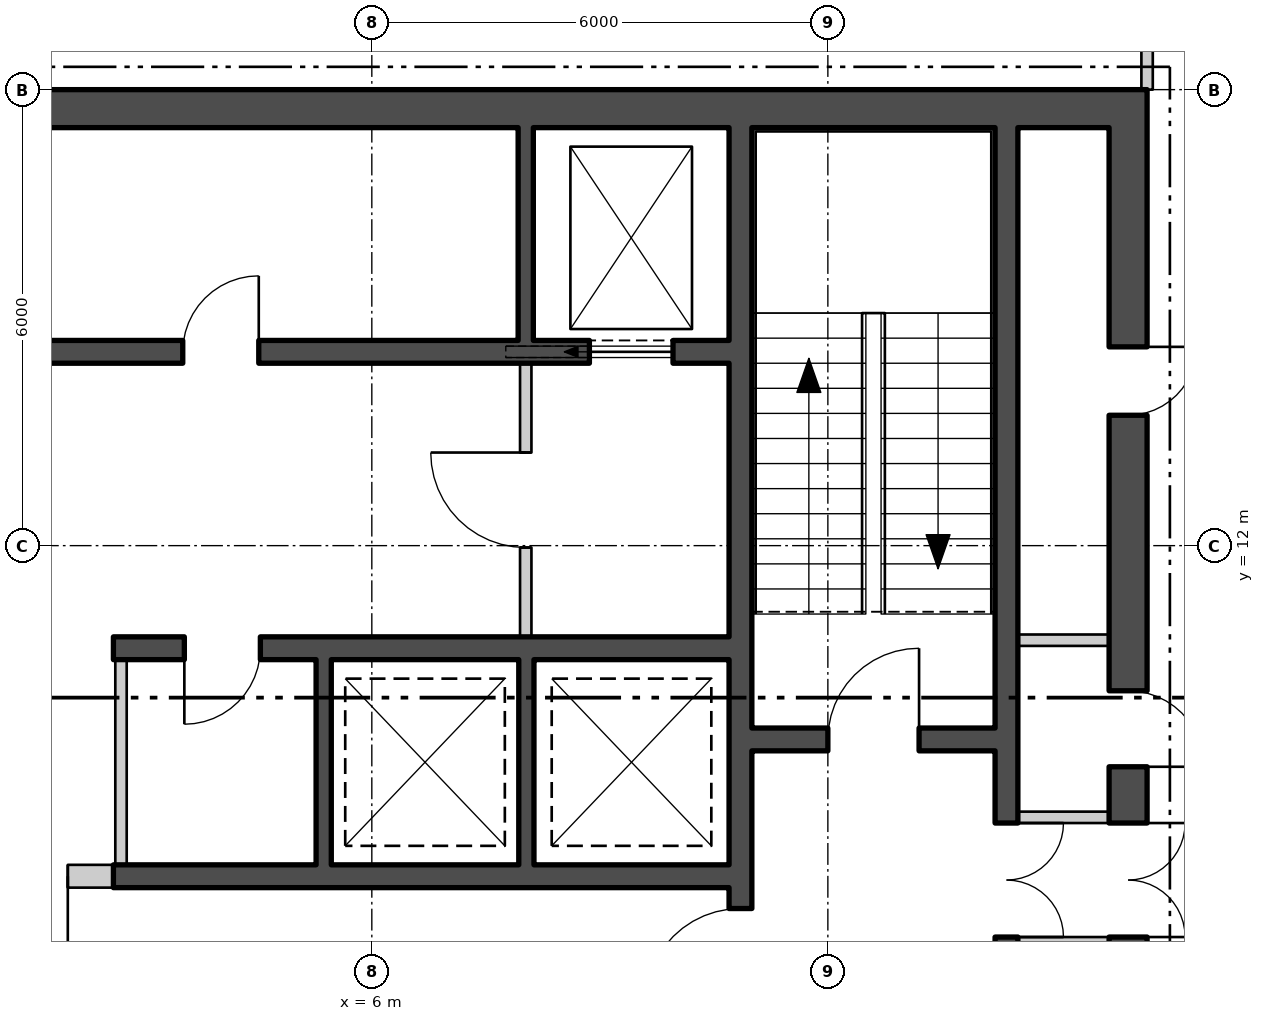
"""IFC4 building model, lengths in metres.
Left out: names, types, materials, properties, quantities, classifications, styles, units other than length and angle.
Written with IfcOpenShell. Run it as: python <this file> out.ifc"""

import sys

from ifc_helpers import new_model, si_unit, direction, frame, frame_2d, origin, place, context, subcontext, project, spatial, polyline, rectangle, outline, extrude, element, fill, save


model = new_model("IFC4")
c1 = context("Model", 3, precision=1e-05, world=origin(), true_north=direction((0.0, 1.0)))
c2 = subcontext(c1, "Body", "Model", "MODEL_VIEW")
j1 = project(units=[si_unit("LENGTHUNIT", "METRE"), si_unit("PLANEANGLEUNIT", "RADIAN")], contexts=[c1])
p1 = place(None, origin())
s1 = spatial("IfcSite", under=j1, at=p1, CompositionType="ELEMENT")
p2 = place(p1, origin())
s2 = spatial("IfcBuilding", under=s1, at=p2, CompositionType="ELEMENT")
p3 = place(p2, frame((0.0, 0.0, 151.5)))
s3 = spatial("IfcBuildingStorey", under=s2, at=p3, CompositionType="ELEMENT", Elevation=151.5)
p4 = place(p3, frame((4.21, -26.921, -0.18), z_axis=(0.0, 0.0, 1.0), x_axis=(0.500000141277, 0.866025322218, 0.0)))
e1 = element("IfcWall", 1, at=p4, inside=s3, PredefinedType="SOLIDWALL", context=c2, shape_type="SweptSolid", body=[
    extrude(outline(polyline([(-0.13, -0.225), (45.86, -0.225), (45.6, 0.225), (0.13, 0.225), (-0.13, -0.225)])), origin(), (0.0, 0.0, 1.0), 3.68),
])
p5 = place(p4, frame((1.424, 0.0, 1.08)))
e2 = element("IfcOpeningElement", 2, at=p5, cuts=e1, PredefinedType="OPENING", context=c2, shape_type="SweptSolid", body=[
    extrude(rectangle(XDim=2.4, YDim=2.0, at=frame_2d((1.2, 1.0))), frame((0.0, 0.235, 0.0), z_axis=(0.0, -1.0, 0.0), x_axis=(1.0, 0.0, 0.0)), (0.0, 0.0, 1.0), 0.47),
])
p6 = place(p4, frame((5.892, 0.0, 1.08)))
e3 = element("IfcOpeningElement", 3, at=p6, cuts=e1, PredefinedType="OPENING", context=c2, shape_type="SweptSolid", body=[
    extrude(rectangle(XDim=2.4, YDim=2.0, at=frame_2d((1.2, 1.0))), frame((0.0, 0.235, 0.0), z_axis=(0.0, -1.0, 0.0), x_axis=(1.0, 0.0, 0.0)), (0.0, 0.0, 1.0), 0.47),
])
p7 = place(p4, frame((10.399, 0.0, 1.08)))
e4 = element("IfcOpeningElement", 4, at=p7, cuts=e1, PredefinedType="OPENING", context=c2, shape_type="SweptSolid", body=[
    extrude(rectangle(XDim=2.4, YDim=2.0, at=frame_2d((1.2, 1.0))), frame((0.0, 0.235, 0.0), z_axis=(0.0, -1.0, 0.0), x_axis=(1.0, 0.0, 0.0)), (0.0, 0.0, 1.0), 0.47),
])
p8 = place(p4, frame((14.905, 0.0, 1.08)))
e5 = element("IfcOpeningElement", 5, at=p8, cuts=e1, PredefinedType="OPENING", context=c2, shape_type="SweptSolid", body=[
    extrude(rectangle(XDim=2.4, YDim=2.0, at=frame_2d((1.2, 1.0))), frame((0.0, 0.235, 0.0), z_axis=(0.0, -1.0, 0.0), x_axis=(1.0, 0.0, 0.0)), (0.0, 0.0, 1.0), 0.47),
])
p9 = place(p4, frame((19.412, 0.0, 1.08)))
e6 = element("IfcOpeningElement", 6, at=p9, cuts=e1, PredefinedType="OPENING", context=c2, shape_type="SweptSolid", body=[
    extrude(rectangle(XDim=2.4, YDim=2.0, at=frame_2d((1.2, 1.0))), frame((0.0, 0.235, 0.0), z_axis=(0.0, -1.0, 0.0), x_axis=(1.0, 0.0, 0.0)), (0.0, 0.0, 1.0), 0.47),
])
p10 = place(p4, frame((23.918, 0.0, 1.08)))
e7 = element("IfcOpeningElement", 7, at=p10, cuts=e1, PredefinedType="OPENING", context=c2, shape_type="SweptSolid", body=[
    extrude(rectangle(XDim=2.4, YDim=2.0, at=frame_2d((1.2, 1.0))), frame((0.0, 0.235, 0.0), z_axis=(0.0, -1.0, 0.0), x_axis=(1.0, 0.0, 0.0)), (0.0, 0.0, 1.0), 0.47),
])
p11 = place(p4, frame((37.438, 0.0, 1.08)))
e8 = element("IfcOpeningElement", 8, at=p11, cuts=e1, PredefinedType="OPENING", context=c2, shape_type="SweptSolid", body=[
    extrude(rectangle(XDim=2.4, YDim=2.0, at=frame_2d((1.2, 1.0))), frame((0.0, 0.235, 0.0), z_axis=(0.0, -1.0, 0.0), x_axis=(1.0, 0.0, 0.0)), (0.0, 0.0, 1.0), 0.47),
])
p12 = place(p4, frame((41.907, 0.0, 1.08)))
e9 = element("IfcOpeningElement", 9, at=p12, cuts=e1, PredefinedType="OPENING", context=c2, shape_type="SweptSolid", body=[
    extrude(rectangle(XDim=2.4, YDim=2.0, at=frame_2d((1.2, 1.0))), frame((0.0, 0.235, 0.0), z_axis=(0.0, -1.0, 0.0), x_axis=(1.0, 0.0, 0.0)), (0.0, 0.0, 1.0), 0.47),
])
p13 = place(p3, frame((-16.2, 17.75, 0.0), z_axis=(0.0, 0.0, 1.0), x_axis=(1.0, 0.0, 0.0)))
e10 = element("IfcWall", 10, at=p13, inside=s3, PredefinedType="SHEAR", context=c2, shape_type="SweptSolid", body=[
    extrude(rectangle(XDim=32.4, YDim=0.5, at=frame_2d((16.2, 0.0))), origin(), (0.0, 0.0, 1.0), 3.7),
])
p14 = place(p3, frame((15.95, 2.5, 0.0), z_axis=(0.0, 0.0, 1.0), x_axis=(0.0, 1.0, 0.0)))
e11 = element("IfcWall", 11, at=p14, inside=s3, PredefinedType="SHEAR", context=c2, shape_type="SweptSolid", body=[
    extrude(rectangle(XDim=15.0, YDim=0.5, at=frame_2d((7.5, 0.0))), origin(), (0.0, 0.0, 1.0), 3.7),
])
p15 = place(p14, frame((4.35, 0.0, 0.0)))
e12 = element("IfcOpeningElement", 12, at=p15, cuts=e11, PredefinedType="OPENING", context=c2, shape_type="SweptSolid", body=[
    extrude(rectangle(XDim=1.5, YDim=2.1, at=frame_2d((0.75, 1.05))), frame((0.0, 0.26, 0.0), z_axis=(0.0, -1.0, 0.0), x_axis=(1.0, 0.0, 0.0)), (0.0, 0.0, 1.0), 0.52),
])
p16 = place(p14, frame((0.825, 0.0, 0.0)))
e13 = element("IfcOpeningElement", 13, at=p16, cuts=e11, PredefinedType="OPENING", context=c2, shape_type="SweptSolid", body=[
    extrude(rectangle(XDim=0.9, YDim=2.1, at=frame_2d((0.45, 1.05))), frame((0.0, 0.26, 0.0), z_axis=(0.0, -1.0, 0.0), x_axis=(1.0, 0.0, 0.0)), (0.0, 0.0, 1.0), 0.52),
])
p17 = place(p14, frame((3.0, 0.0, 0.0)))
e14 = element("IfcOpeningElement", 14, at=p17, cuts=e11, PredefinedType="OPENING", context=c2, shape_type="SweptSolid", body=[
    extrude(rectangle(XDim=0.9, YDim=2.1, at=frame_2d((0.45, 1.05))), frame((0.0, 0.26, 0.0), z_axis=(0.0, -1.0, 0.0), x_axis=(1.0, 0.0, 0.0)), (0.0, 0.0, 1.0), 0.52),
])
p18 = place(p14, frame((6.59, 0.0, 0.0)))
e15 = element("IfcOpeningElement", 15, at=p18, cuts=e11, PredefinedType="OPENING", context=c2, shape_type="SweptSolid", body=[
    extrude(rectangle(XDim=1.0, YDim=2.1, at=frame_2d((0.5, 1.05))), frame((0.0, 0.26, 0.0), z_axis=(0.0, -1.0, 0.0), x_axis=(1.0, 0.0, 0.0)), (0.0, 0.0, 1.0), 0.52),
])
p19 = place(p14, frame((11.215, 0.0, 0.0)))
e16 = element("IfcOpeningElement", 16, at=p19, cuts=e11, PredefinedType="OPENING", context=c2, shape_type="SweptSolid", body=[
    extrude(rectangle(XDim=0.9, YDim=2.1, at=frame_2d((0.45, 1.05))), frame((0.0, 0.26, 0.0), z_axis=(0.0, -1.0, 0.0), x_axis=(1.0, 0.0, 0.0)), (0.0, 0.0, 1.0), 0.52),
])
p20 = place(p3, frame((10.85, 2.5, 0.0), z_axis=(0.0, 0.0, 1.0), x_axis=(0.0, 1.0, 0.0)))
e17 = element("IfcWall", 17, at=p20, inside=s3, PredefinedType="SHEAR", context=c2, shape_type="SweptSolid", body=[
    extrude(rectangle(XDim=15.0, YDim=0.3, at=frame_2d((7.5, 0.0))), origin(), (0.0, 0.0, 1.0), 3.7),
])
p21 = place(p20, frame((3.475, 0.0, 0.0)))
e18 = element("IfcOpeningElement", 18, at=p21, cuts=e17, PredefinedType="OPENING", context=c2, shape_type="SweptSolid", body=[
    extrude(rectangle(XDim=1.25, YDim=2.1, at=frame_2d((0.625, 1.05))), frame((0.0, 0.16, 0.0), z_axis=(0.0, -1.0, 0.0), x_axis=(1.0, 0.0, 0.0)), (0.0, 0.0, 1.0), 0.32),
])
p22 = place(p20, frame((1.125, 0.0, 0.0)))
e19 = element("IfcOpeningElement", 19, at=p22, cuts=e17, PredefinedType="OPENING", context=c2, shape_type="SweptSolid", body=[
    extrude(rectangle(XDim=1.0, YDim=2.1, at=frame_2d((0.5, 1.05))), frame((0.0, 0.16, 0.0), z_axis=(0.0, -1.0, 0.0), x_axis=(1.0, 0.0, 0.0)), (0.0, 0.0, 1.0), 0.32),
])
p23 = place(p3, frame((14.35, 2.5, 0.0), z_axis=(0.0, 0.0, 1.0), x_axis=(0.0, 1.0, 0.0)))
e20 = element("IfcWall", 20, at=p23, inside=s3, PredefinedType="SHEAR", context=c2, shape_type="SweptSolid", body=[
    extrude(rectangle(XDim=15.0, YDim=0.3, at=frame_2d((7.5, 0.0))), origin(), (0.0, 0.0, 1.0), 3.7),
])
p24 = place(p23, frame((4.35, 0.0, 0.0)))
e21 = element("IfcOpeningElement", 21, at=p24, cuts=e20, PredefinedType="OPENING", context=c2, shape_type="SweptSolid", body=[
    extrude(rectangle(XDim=1.5, YDim=2.1, at=frame_2d((0.75, 1.05))), frame((0.0, 0.16, 0.0), z_axis=(0.0, -1.0, 0.0), x_axis=(1.0, 0.0, 0.0)), (0.0, 0.0, 1.0), 0.32),
])
p25 = place(p3, frame((11.0, 9.45, 0.0), z_axis=(0.0, 0.0, 1.0), x_axis=(1.0, 0.0, 0.0)))
e22 = element("IfcWall", 22, at=p25, inside=s3, PredefinedType="SHEAR", context=c2, shape_type="SweptSolid", body=[
    extrude(rectangle(XDim=3.2, YDim=0.3, at=frame_2d((1.6, 0.0))), origin(), (0.0, 0.0, 1.0), 3.7),
])
p26 = place(p25, frame((1.0, 0.0, 0.0)))
e23 = element("IfcOpeningElement", 23, at=p26, cuts=e22, PredefinedType="OPENING", context=c2, shape_type="SweptSolid", body=[
    extrude(rectangle(XDim=1.2, YDim=2.1, at=frame_2d((0.6, 1.05))), frame((0.0, 0.16, 0.0), z_axis=(0.0, -1.0, 0.0), x_axis=(1.0, 0.0, 0.0)), (0.0, 0.0, 1.0), 0.32),
])
p27 = place(p3, frame((-10.7, 14.55, 0.0), z_axis=(0.0, 0.0, 1.0), x_axis=(1.0, 0.0, 0.0)))
e24 = element("IfcWall", 24, at=p27, inside=s3, PredefinedType="SHEAR", context=c2, shape_type="SweptSolid", body=[
    extrude(rectangle(XDim=21.4, YDim=0.3, at=frame_2d((10.7, 0.0))), origin(), (0.0, 0.0, 1.0), 3.7),
])
p28 = place(p27, frame((0.738, 0.0, 0.0)))
e25 = element("IfcOpeningElement", 25, at=p28, cuts=e24, PredefinedType="OPENING", context=c2, shape_type="SweptSolid", body=[
    extrude(rectangle(XDim=1.1, YDim=2.1, at=frame_2d((0.55, 1.05))), frame((0.0, 0.16, 0.0), z_axis=(0.0, -1.0, 0.0), x_axis=(1.0, 0.0, 0.0)), (0.0, 0.0, 1.0), 0.32),
])
p29 = place(p27, frame((3.462, 0.0, 0.0)))
e26 = element("IfcOpeningElement", 26, at=p29, cuts=e24, PredefinedType="OPENING", context=c2, shape_type="SweptSolid", body=[
    extrude(rectangle(XDim=1.1, YDim=2.1, at=frame_2d((0.55, 1.05))), frame((0.0, 0.16, 0.0), z_axis=(0.0, -1.0, 0.0), x_axis=(1.0, 0.0, 0.0)), (0.0, 0.0, 1.0), 0.32),
])
p30 = place(p27, frame((6.138, 0.0, 0.0)))
e27 = element("IfcOpeningElement", 27, at=p30, cuts=e24, PredefinedType="OPENING", context=c2, shape_type="SweptSolid", body=[
    extrude(rectangle(XDim=1.1, YDim=2.1, at=frame_2d((0.55, 1.05))), frame((0.0, 0.16, 0.0), z_axis=(0.0, -1.0, 0.0), x_axis=(1.0, 0.0, 0.0)), (0.0, 0.0, 1.0), 0.32),
])
p31 = place(p27, frame((8.812, 0.0, 0.0)))
e28 = element("IfcOpeningElement", 28, at=p31, cuts=e24, PredefinedType="OPENING", context=c2, shape_type="SweptSolid", body=[
    extrude(rectangle(XDim=1.1, YDim=2.1, at=frame_2d((0.55, 1.05))), frame((0.0, 0.16, 0.0), z_axis=(0.0, -1.0, 0.0), x_axis=(1.0, 0.0, 0.0)), (0.0, 0.0, 1.0), 0.32),
])
p32 = place(p27, frame((19.562, 0.0, 0.0)))
e29 = element("IfcOpeningElement", 29, at=p32, cuts=e24, PredefinedType="OPENING", context=c2, shape_type="SweptSolid", body=[
    extrude(rectangle(XDim=1.1, YDim=2.1, at=frame_2d((0.55, 1.05))), frame((0.0, 0.16, 0.0), z_axis=(0.0, -1.0, 0.0), x_axis=(1.0, 0.0, 0.0)), (0.0, 0.0, 1.0), 0.32),
])
p33 = place(p27, frame((14.213, 0.0, 0.0)))
e30 = element("IfcOpeningElement", 30, at=p33, cuts=e24, PredefinedType="OPENING", context=c2, shape_type="SweptSolid", body=[
    extrude(rectangle(XDim=1.0, YDim=2.1, at=frame_2d((0.5, 1.05))), frame((0.0, 0.16, 0.0), z_axis=(0.0, -1.0, 0.0), x_axis=(1.0, 0.0, 0.0)), (0.0, 0.0, 1.0), 0.32),
])
p34 = place(p3, frame((2.6, 10.65, 0.0), z_axis=(0.0, 0.0, 1.0), x_axis=(1.0, 0.0, 0.0)))
e31 = element("IfcWall", 31, at=p34, inside=s3, PredefinedType="SHEAR", context=c2, shape_type="SweptSolid", body=[
    extrude(rectangle(XDim=8.1, YDim=0.3, at=frame_2d((4.05, 0.0))), origin(), (0.0, 0.0, 1.0), 3.7),
])
p35 = place(p34, frame((0.933, 0.0, 0.0)))
e32 = element("IfcOpeningElement", 32, at=p35, cuts=e31, PredefinedType="OPENING", context=c2, shape_type="SweptSolid", body=[
    extrude(rectangle(XDim=1.0, YDim=2.1, at=frame_2d((0.5, 1.05))), frame((0.0, 0.16, 0.0), z_axis=(0.0, -1.0, 0.0), x_axis=(1.0, 0.0, 0.0)), (0.0, 0.0, 1.0), 0.32),
])
p36 = place(p3, frame((2.6, 7.65, 0.0), z_axis=(0.0, 0.0, 1.0), x_axis=(1.0, 0.0, 0.0)))
e33 = element("IfcWall", 33, at=p36, inside=s3, PredefinedType="SHEAR", context=c2, shape_type="SweptSolid", body=[
    extrude(rectangle(XDim=8.1, YDim=0.3, at=frame_2d((4.05, 0.0))), origin(), (0.0, 0.0, 1.0), 3.7),
])
p37 = place(p3, frame((8.025, 14.7, 0.0), z_axis=(0.0, 0.0, 1.0), x_axis=(0.0, 1.0, 0.0)))
e34 = element("IfcWall", 34, at=p37, inside=s3, PredefinedType="SHEAR", context=c2, shape_type="SweptSolid", body=[
    extrude(rectangle(XDim=2.8, YDim=0.2, at=frame_2d((1.4, 0.0))), origin(), (0.0, 0.0, 1.0), 3.7),
])
p38 = place(p3, frame((2.7, 7.8, 0.0), z_axis=(0.0, 0.0, 1.0), x_axis=(0.0, 1.0, 0.0)))
e35 = element("IfcWall", 35, at=p38, inside=s3, PredefinedType="PARTITIONING", context=c2, shape_type="SweptSolid", body=[
    extrude(rectangle(XDim=2.7, YDim=0.15, at=frame_2d((1.35, 0.0))), origin(), (0.0, 0.0, 1.0), 3.7),
])
for number, where, z_axis, x_axis in (
    (36, (5.367, 7.8, 0.0), (0.0, 0.0, 1.0), (0.0, 1.0, 0.0)),
    (37, (8.033, 7.8, 0.0), (0.0, 0.0, 1.0), (0.0, 1.0, 0.0)),
):
    element("IfcWall", number, at=place(p3, frame(where, z_axis=z_axis, x_axis=x_axis)), inside=s3, PredefinedType="SHEAR", context=c2, shape_type="SweptSolid", body=[
        extrude(rectangle(XDim=2.7, YDim=0.2, at=frame_2d((1.35, 0.0))), origin(), (0.0, 0.0, 1.0), 3.7),
    ])
p39 = place(p3, frame((8.025, 10.8, 0.0), z_axis=(0.0, 0.0, 1.0), x_axis=(0.0, 1.0, 0.0)))
e38 = element("IfcWall", 38, at=p39, inside=s3, PredefinedType="PARTITIONING", context=c2, shape_type="SweptSolid", body=[
    extrude(rectangle(XDim=3.6, YDim=0.15, at=frame_2d((1.8, 0.0))), origin(), (0.0, 0.0, 1.0), 3.7),
])
p40 = place(p39, frame((1.175, 0.0, 0.0)))
e39 = element("IfcOpeningElement", 39, at=p40, cuts=e38, PredefinedType="OPENING", context=c2, shape_type="SweptSolid", body=[
    extrude(rectangle(XDim=1.25, YDim=2.1, at=frame_2d((0.625, 1.05))), frame((0.0, 0.085, 0.0), z_axis=(0.0, -1.0, 0.0), x_axis=(1.0, 0.0, 0.0)), (0.0, 0.0, 1.0), 0.17),
])
for number, where, z_axis, x_axis in (
    (40, (14.5, 6.775, 0.0), (0.0, 0.0, 1.0), (1.0, 0.0, 0.0)),
    (41, (14.5, 8.425, 0.0), (0.0, 0.0, 1.0), (1.0, 0.0, 0.0)),
    (42, (14.5, 10.756, 0.0), (0.0, 0.0, 1.0), (1.0, 0.0, 0.0)),
):
    element("IfcWall", number, at=place(p3, frame(where, z_axis=z_axis, x_axis=x_axis)), inside=s3, PredefinedType="PARTITIONING", context=c2, shape_type="SweptSolid", body=[
        extrude(rectangle(XDim=1.2, YDim=0.15, at=frame_2d((0.6, 0.0))), origin(), (0.0, 0.0, 1.0), 3.7),
    ])
p41 = place(p3, frame((-0.4, 7.65, 0.0), z_axis=(0.0, 0.0, 1.0), x_axis=(1.0, 0.0, 0.0)))
e43 = element("IfcWall", 43, at=p41, inside=s3, PredefinedType="PARTITIONING", context=c2, shape_type="SweptSolid", body=[
    extrude(rectangle(XDim=3.0, YDim=0.3, at=frame_2d((1.5, 0.0))), origin(), (0.0, 0.0, 1.0), 3.7),
])
p42 = place(p41, frame((0.6, 0.0, 0.0)))
e44 = element("IfcOpeningElement", 44, at=p42, cuts=e43, PredefinedType="OPENING", context=c2, shape_type="SweptSolid", body=[
    extrude(rectangle(XDim=1.8, YDim=2.4, at=frame_2d((0.9, 1.2))), frame((0.0, 0.16, 0.0), z_axis=(0.0, -1.0, 0.0), x_axis=(1.0, 0.0, 0.0)), (0.0, 0.0, 1.0), 0.32),
])
p43 = place(p3, frame((16.2, 18.0, 0.0), z_axis=(0.0, 0.0, 1.0), x_axis=(0.0, 1.0, 0.0)))
e45 = element("IfcWall", 45, at=p43, inside=s3, PredefinedType="PARTITIONING", context=c2, shape_type="SweptSolid", body=[
    extrude(rectangle(XDim=1.75, YDim=0.15, at=frame_2d((0.875, 0.0))), origin(), (0.0, 0.0, 1.0), 3.7),
])
p44 = place(p32, origin())
e46 = element("IfcDoor", 46, at=p44, inside=s3, OperationType="SLIDING_TO_LEFT", PredefinedType="DOOR", context=c2, shape_type="SweptSolid", body=[
    extrude(rectangle(XDim=1.1, YDim=2.1, at=frame_2d((0.55, 1.05))), frame((0.0, 0.025, 0.0), z_axis=(0.0, -1.0, 0.0), x_axis=(1.0, 0.0, 0.0)), (0.0, 0.0, 1.0), 0.05),
])
fill(e29, e46)
p45 = place(p33, origin())
e47 = element("IfcDoor", 47, at=p45, inside=s3, OperationType="SINGLE_SWING_LEFT", PredefinedType="DOOR", context=c2, shape_type="SweptSolid", body=[
    extrude(rectangle(XDim=1.0, YDim=2.1, at=frame_2d((0.5, 1.05))), frame((0.0, 0.025, 0.0), z_axis=(0.0, -1.0, 0.0), x_axis=(1.0, 0.0, 0.0)), (0.0, 0.0, 1.0), 0.05),
])
fill(e30, e47)
p46 = place(p35, origin())
e48 = element("IfcDoor", 48, at=p46, inside=s3, OperationType="SINGLE_SWING_LEFT", PredefinedType="DOOR", context=c2, shape_type="SweptSolid", body=[
    extrude(rectangle(XDim=1.0, YDim=2.1, at=frame_2d((0.5, 1.05))), frame((0.0, 0.025, 0.0), z_axis=(0.0, -1.0, 0.0), x_axis=(1.0, 0.0, 0.0)), (0.0, 0.0, 1.0), 0.05),
])
fill(e32, e48)
p47 = place(p40, origin())
e49 = element("IfcDoor", 49, at=p47, inside=s3, OperationType="SINGLE_SWING_LEFT", PredefinedType="DOOR", context=c2, shape_type="SweptSolid", body=[
    extrude(rectangle(XDim=1.25, YDim=2.1, at=frame_2d((0.625, 1.05))), frame((0.0, 0.025, 0.0), z_axis=(0.0, -1.0, 0.0), x_axis=(1.0, 0.0, 0.0)), (0.0, 0.0, 1.0), 0.05),
])
fill(e39, e49)
p48 = place(p26, origin())
e50 = element("IfcDoor", 50, at=p48, inside=s3, OperationType="SINGLE_SWING_LEFT", PredefinedType="DOOR", context=c2, shape_type="SweptSolid", body=[
    extrude(rectangle(XDim=1.2, YDim=2.1, at=frame_2d((0.6, 1.05))), frame((0.0, 0.025, 0.0), z_axis=(0.0, -1.0, 0.0), x_axis=(1.0, 0.0, 0.0)), (0.0, 0.0, 1.0), 0.05),
])
fill(e23, e50)
p49 = place(p21, origin())
e51 = element("IfcDoor", 51, at=p49, inside=s3, OperationType="SINGLE_SWING_RIGHT", PredefinedType="DOOR", context=c2, shape_type="SweptSolid", body=[
    extrude(rectangle(XDim=1.25, YDim=2.1, at=frame_2d((0.625, 1.05))), frame((0.0, 0.025, 0.0), z_axis=(0.0, -1.0, 0.0), x_axis=(1.0, 0.0, 0.0)), (0.0, 0.0, 1.0), 0.05),
])
fill(e18, e51)
p50 = place(p24, origin())
e52 = element("IfcDoor", 52, at=p50, inside=s3, OperationType="DOUBLE_DOOR_SINGLE_SWING", PredefinedType="DOOR", context=c2, shape_type="SweptSolid", body=[
    extrude(rectangle(XDim=1.5, YDim=2.1, at=frame_2d((0.75, 1.05))), frame((0.0, 0.025, 0.0), z_axis=(0.0, -1.0, 0.0), x_axis=(1.0, 0.0, 0.0)), (0.0, 0.0, 1.0), 0.05),
])
fill(e21, e52)
p51 = place(p15, origin())
e53 = element("IfcDoor", 53, at=p51, inside=s3, OperationType="DOUBLE_DOOR_SINGLE_SWING", PredefinedType="DOOR", context=c2, shape_type="SweptSolid", body=[
    extrude(rectangle(XDim=1.5, YDim=2.1, at=frame_2d((0.75, 1.05))), frame((0.0, 0.025, 0.0), z_axis=(0.0, -1.0, 0.0), x_axis=(1.0, 0.0, 0.0)), (0.0, 0.0, 1.0), 0.05),
])
fill(e12, e53)
p52 = place(p18, origin())
e54 = element("IfcDoor", 54, at=p52, inside=s3, OperationType="SINGLE_SWING_LEFT", PredefinedType="DOOR", context=c2, shape_type="SweptSolid", body=[
    extrude(rectangle(XDim=1.0, YDim=2.1, at=frame_2d((0.5, 1.05))), frame((0.0, 0.025, 0.0), z_axis=(0.0, -1.0, 0.0), x_axis=(1.0, 0.0, 0.0)), (0.0, 0.0, 1.0), 0.05),
])
fill(e15, e54)
p53 = place(p19, origin())
e55 = element("IfcDoor", 55, at=p53, inside=s3, OperationType="SINGLE_SWING_RIGHT", PredefinedType="DOOR", context=c2, shape_type="SweptSolid", body=[
    extrude(rectangle(XDim=0.9, YDim=2.1, at=frame_2d((0.45, 1.05))), frame((0.0, 0.025, 0.0), z_axis=(0.0, -1.0, 0.0), x_axis=(1.0, 0.0, 0.0)), (0.0, 0.0, 1.0), 0.05),
])
fill(e16, e55)
p54 = place(p42, origin())
e56 = element("IfcDoor", 56, at=p54, inside=s3, OperationType="DOUBLE_DOOR_SINGLE_SWING", PredefinedType="DOOR", context=c2, shape_type="SweptSolid", body=[
    extrude(rectangle(XDim=1.8, YDim=2.4, at=frame_2d((0.9, 1.2))), frame((0.0, 0.025, 0.0), z_axis=(0.0, -1.0, 0.0), x_axis=(1.0, 0.0, 0.0)), (0.0, 0.0, 1.0), 0.05),
])
fill(e44, e56)
save(model, sys.argv[1])
